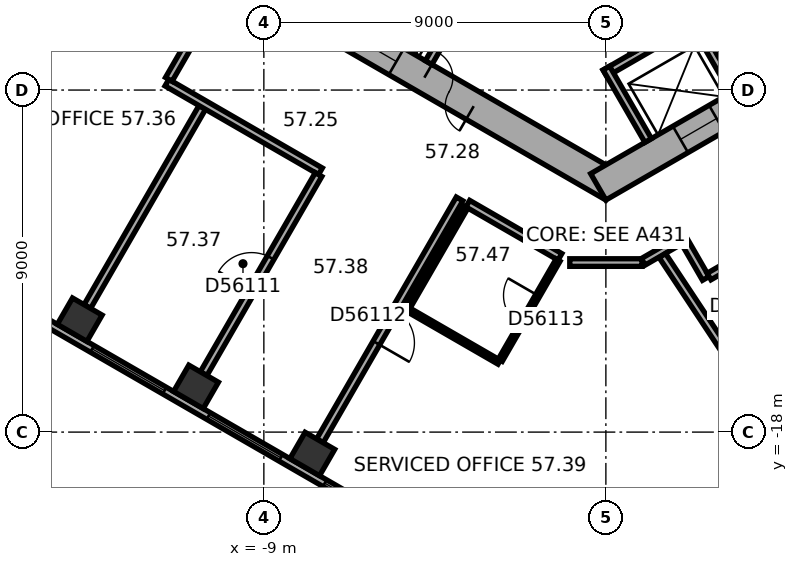
"""IFC4 building model, lengths in metres.
Left out: names, types, materials, properties, quantities, classifications, styles, units other than length and angle.
Written with IfcOpenShell. Run it as: python <this file> out.ifc"""

import sys

from ifc_helpers import new_model, si_unit, direction, frame, frame_2d, origin, origin_2d, place, context, subcontext, project, spatial, rectangle, extrude, element, fill, save


model = new_model("IFC4")
c1 = context("Model", 3, precision=1e-05, world=origin(), true_north=direction((0.0, 1.0)))
c2 = subcontext(c1, "Body", "Model", "MODEL_VIEW")
j1 = project(units=[si_unit("LENGTHUNIT", "METRE"), si_unit("PLANEANGLEUNIT", "RADIAN")], contexts=[c1])
p1 = place(None, origin())
s1 = spatial("IfcSite", under=j1, at=p1, CompositionType="ELEMENT")
p2 = place(p1, origin())
s2 = spatial("IfcBuilding", under=s1, at=p2, CompositionType="ELEMENT")
p3 = place(p2, frame((0.0, 0.0, 232.8)))
s3 = spatial("IfcBuildingStorey", under=s2, at=p3, CompositionType="ELEMENT", Elevation=232.8)
for number, where, z_axis, x_axis in (
    (1, (-13.845, -15.042, 0.0), (0.0, 0.0, 1.0), (0.866, -0.5, 0.0)),
    (2, (-10.785, -16.809, 0.0), (0.0, 0.0, 1.0), (0.866, -0.5, 0.0)),
    (3, (-7.725, -18.576, 0.0), (0.0, 0.0, 1.0), (0.866, -0.5, 0.0)),
):
    element("IfcColumn", number, at=place(p3, frame(where, z_axis=z_axis, x_axis=x_axis)), inside=s3, PredefinedType="COLUMN", context=c2, shape_type="SweptSolid", body=[
        extrude(rectangle(XDim=0.9, YDim=0.8, at=origin_2d()), origin(), (0.0, 0.0, 1.0), 3.7),
    ])
p4 = place(p3, frame((-10.1, -5.6, 0.0), z_axis=(0.0, 0.0, 1.0), x_axis=(0.866023897231, -0.500002609418, 0.0)))
e4 = element("IfcWall", 4, at=p4, inside=s3, PredefinedType="SHEAR", context=c2, shape_type="SweptSolid", body=[
    extrude(rectangle(XDim=11.894, YDim=0.8, at=frame_2d((5.947, 0.0))), origin(), (0.0, 0.0, 1.0), 3.7),
])
p5 = place(p4, frame((6.147, 0.0, 0.0)))
e5 = element("IfcOpeningElement", 5, at=p5, cuts=e4, PredefinedType="OPENING", context=c2, shape_type="SweptSolid", body=[
    extrude(rectangle(XDim=1.5, YDim=2.1, at=frame_2d((0.75, 1.05))), frame((0.0, 0.41, 0.0), z_axis=(0.0, -1.0, 0.0), x_axis=(1.0, 0.0, 0.0)), (0.0, 0.0, 1.0), 0.82),
])
p6 = place(p4, frame((1.597, 0.0, 0.0)))
e6 = element("IfcOpeningElement", 6, at=p6, cuts=e4, PredefinedType="OPENING", context=c2, shape_type="SweptSolid", body=[
    extrude(rectangle(XDim=1.1, YDim=2.1, at=frame_2d((0.55, 1.05))), frame((0.0, 0.41, 0.0), z_axis=(0.0, -1.0, 0.0), x_axis=(1.0, 0.0, 0.0)), (0.0, 0.0, 1.0), 0.82),
])
p7 = place(p4, frame((4.197, 0.0, 0.0)))
e7 = element("IfcOpeningElement", 7, at=p7, cuts=e4, PredefinedType="OPENING", context=c2, shape_type="SweptSolid", body=[
    extrude(rectangle(XDim=1.1, YDim=2.1, at=frame_2d((0.55, 1.05))), frame((0.0, 0.41, 0.0), z_axis=(0.0, -1.0, 0.0), x_axis=(1.0, 0.0, 0.0)), (0.0, 0.0, 1.0), 0.82),
])
p8 = place(p3, frame((-0.2, -11.547, 0.0), z_axis=(0.0, 0.0, 1.0), x_axis=(0.866023897231, 0.500002609418, 0.0)))
e8 = element("IfcWall", 8, at=p8, inside=s3, PredefinedType="SHEAR", context=c2, shape_type="SweptSolid", body=[
    extrude(rectangle(XDim=11.894, YDim=0.8, at=frame_2d((5.947, 0.0))), origin(), (0.0, 0.0, 1.0), 3.7),
])
p9 = place(p8, frame((2.497, 0.0, 0.0)))
e9 = element("IfcOpeningElement", 9, at=p9, cuts=e8, PredefinedType="OPENING", context=c2, shape_type="SweptSolid", body=[
    extrude(rectangle(XDim=1.1, YDim=2.1, at=frame_2d((0.55, 1.05))), frame((0.0, 0.41, 0.0), z_axis=(0.0, -1.0, 0.0), x_axis=(1.0, 0.0, 0.0)), (0.0, 0.0, 1.0), 0.82),
])
p10 = place(p8, frame((5.097, 0.0, 0.0)))
e10 = element("IfcOpeningElement", 10, at=p10, cuts=e8, PredefinedType="OPENING", context=c2, shape_type="SweptSolid", body=[
    extrude(rectangle(XDim=1.1, YDim=2.1, at=frame_2d((0.55, 1.05))), frame((0.0, 0.41, 0.0), z_axis=(0.0, -1.0, 0.0), x_axis=(1.0, 0.0, 0.0)), (0.0, 0.0, 1.0), 0.82),
])
p11 = place(p8, frame((7.697, 0.0, 0.0)))
e11 = element("IfcOpeningElement", 11, at=p11, cuts=e8, PredefinedType="OPENING", context=c2, shape_type="SweptSolid", body=[
    extrude(rectangle(XDim=1.1, YDim=2.1, at=frame_2d((0.55, 1.05))), frame((0.0, 0.41, 0.0), z_axis=(0.0, -1.0, 0.0), x_axis=(1.0, 0.0, 0.0)), (0.0, 0.0, 1.0), 0.82),
])
p12 = place(p3, frame((-17.664, -13.415, 0.0), z_axis=(0.0, 0.0, 1.0), x_axis=(0.866026555358, -0.49999800541, 0.0)))
e12 = element("IfcWall", 12, at=p12, inside=s3, PredefinedType="STANDARD", context=c2, shape_type="SweptSolid", body=[
    extrude(rectangle(XDim=18.841, YDim=0.2, at=frame_2d((9.421, 0.0))), origin(), (0.0, 0.0, 1.0), 3.7),
])
p13 = place(p12, frame((1.254, 0.0, 0.9)))
e13 = element("IfcOpeningElement", 13, at=p13, cuts=e12, PredefinedType="OPENING", context=c2, shape_type="SweptSolid", body=[
    extrude(rectangle(XDim=2.2, YDim=2.0, at=frame_2d((1.1, 1.0))), frame((0.0, 0.11, 0.0), z_axis=(0.0, -1.0, 0.0), x_axis=(1.0, 0.0, 0.0)), (0.0, 0.0, 1.0), 0.22),
])
p14 = place(p12, frame((4.788, 0.0, 0.9)))
e14 = element("IfcOpeningElement", 14, at=p14, cuts=e12, PredefinedType="OPENING", context=c2, shape_type="SweptSolid", body=[
    extrude(rectangle(XDim=2.2, YDim=2.0, at=frame_2d((1.1, 1.0))), frame((0.0, 0.11, 0.0), z_axis=(0.0, -1.0, 0.0), x_axis=(1.0, 0.0, 0.0)), (0.0, 0.0, 1.0), 0.22),
])
p15 = place(p12, frame((8.322, 0.0, 0.9)))
e15 = element("IfcOpeningElement", 15, at=p15, cuts=e12, PredefinedType="OPENING", context=c2, shape_type="SweptSolid", body=[
    extrude(rectangle(XDim=2.2, YDim=2.0, at=frame_2d((1.1, 1.0))), frame((0.0, 0.11, 0.0), z_axis=(0.0, -1.0, 0.0), x_axis=(1.0, 0.0, 0.0)), (0.0, 0.0, 1.0), 0.22),
])
p16 = place(p12, frame((11.855, 0.0, 0.9)))
e16 = element("IfcOpeningElement", 16, at=p16, cuts=e12, PredefinedType="OPENING", context=c2, shape_type="SweptSolid", body=[
    extrude(rectangle(XDim=2.2, YDim=2.0, at=frame_2d((1.1, 1.0))), frame((0.0, 0.11, 0.0), z_axis=(0.0, -1.0, 0.0), x_axis=(1.0, 0.0, 0.0)), (0.0, 0.0, 1.0), 0.22),
])
p17 = place(p12, frame((15.389, 0.0, 0.9)))
e17 = element("IfcOpeningElement", 17, at=p17, cuts=e12, PredefinedType="OPENING", context=c2, shape_type="SweptSolid", body=[
    extrude(rectangle(XDim=2.2, YDim=2.0, at=frame_2d((1.1, 1.0))), frame((0.0, 0.11, 0.0), z_axis=(0.0, -1.0, 0.0), x_axis=(1.0, 0.0, 0.0)), (0.0, 0.0, 1.0), 0.22),
])
p18 = place(p3, frame((2.739, -22.711, 0.0), z_axis=(0.0, 0.0, 1.0), x_axis=(0.833885723098, 0.551937134838, 0.0)))
e18 = element("IfcWall", 18, at=p18, inside=s3, PredefinedType="STANDARD", context=c2, shape_type="SweptSolid", body=[
    extrude(rectangle(XDim=18.841, YDim=0.2, at=frame_2d((9.421, 0.0))), origin(), (0.0, 0.0, 1.0), 3.7),
])
p19 = place(p18, frame((1.252, 0.0, 0.9)))
e19 = element("IfcOpeningElement", 19, at=p19, cuts=e18, PredefinedType="OPENING", context=c2, shape_type="SweptSolid", body=[
    extrude(rectangle(XDim=2.2, YDim=2.0, at=frame_2d((1.1, 1.0))), frame((0.0, 0.11, 0.0), z_axis=(0.0, -1.0, 0.0), x_axis=(1.0, 0.0, 0.0)), (0.0, 0.0, 1.0), 0.22),
])
p20 = place(p18, frame((4.786, 0.0, 0.9)))
e20 = element("IfcOpeningElement", 20, at=p20, cuts=e18, PredefinedType="OPENING", context=c2, shape_type="SweptSolid", body=[
    extrude(rectangle(XDim=2.2, YDim=2.0, at=frame_2d((1.1, 1.0))), frame((0.0, 0.11, 0.0), z_axis=(0.0, -1.0, 0.0), x_axis=(1.0, 0.0, 0.0)), (0.0, 0.0, 1.0), 0.22),
])
p21 = place(p18, frame((8.32, 0.0, 0.9)))
e21 = element("IfcOpeningElement", 21, at=p21, cuts=e18, PredefinedType="OPENING", context=c2, shape_type="SweptSolid", body=[
    extrude(rectangle(XDim=2.2, YDim=2.0, at=frame_2d((1.1, 1.0))), frame((0.0, 0.11, 0.0), z_axis=(0.0, -1.0, 0.0), x_axis=(1.0, 0.0, 0.0)), (0.0, 0.0, 1.0), 0.22),
])
p22 = place(p18, frame((11.854, 0.0, 0.9)))
e22 = element("IfcOpeningElement", 22, at=p22, cuts=e18, PredefinedType="OPENING", context=c2, shape_type="SweptSolid", body=[
    extrude(rectangle(XDim=2.2, YDim=2.0, at=frame_2d((1.1, 1.0))), frame((0.0, 0.11, 0.0), z_axis=(0.0, -1.0, 0.0), x_axis=(1.0, 0.0, 0.0)), (0.0, 0.0, 1.0), 0.22),
])
p23 = place(p18, frame((15.387, 0.0, 0.9)))
e23 = element("IfcOpeningElement", 23, at=p23, cuts=e18, PredefinedType="OPENING", context=c2, shape_type="SweptSolid", body=[
    extrude(rectangle(XDim=2.2, YDim=2.0, at=frame_2d((1.1, 1.0))), frame((0.0, 0.11, 0.0), z_axis=(0.0, -1.0, 0.0), x_axis=(1.0, 0.0, 0.0)), (0.0, 0.0, 1.0), 0.22),
])
p24 = place(p3, frame((-3.563, -6.372, 0.0), z_axis=(0.0, 0.0, 1.0), x_axis=(-0.499994660107, -0.866028486751, 0.0)))
e24 = element("IfcWall", 24, at=p24, inside=s3, PredefinedType="PARTITIONING", context=c2, shape_type="SweptSolid", body=[
    extrude(rectangle(XDim=2.2, YDim=0.2, at=frame_2d((1.1, 0.0))), origin(), (0.0, 0.0, 1.0), 3.42),
])
p25 = place(p3, frame((-0.024, -8.559, 0.0), z_axis=(0.0, 0.0, 1.0), x_axis=(0.866026010844, 0.49999894854, 0.0)))
e25 = element("IfcWall", 25, at=p25, inside=s3, PredefinedType="PARTITIONING", context=c2, shape_type="SweptSolid", body=[
    extrude(rectangle(XDim=8.0, YDim=0.2, at=frame_2d((4.0, 0.0))), origin(), (0.0, 0.0, 1.0), 3.42),
])
for number, where, z_axis, x_axis in (
    (26, (0.013, -8.422, 0.0), (0.0, 0.0, 1.0), (0.5, -0.866, 0.0)),
    (27, (2.264, -7.122, 0.0), (0.0, 0.0, 1.0), (0.5, -0.866, 0.0)),
):
    element("IfcWall", number, at=place(p3, frame(where, z_axis=z_axis, x_axis=x_axis)), inside=s3, PredefinedType="PARTITIONING", context=c2, shape_type="SweptSolid", body=[
        extrude(rectangle(XDim=2.2, YDim=0.2, at=frame_2d((1.1, 0.0))), origin(), (0.0, 0.0, 1.0), 3.42),
    ])
p26 = place(p3, frame((-1.558, -3.902, 0.0), z_axis=(0.0, 0.0, 1.0), x_axis=(0.499977259774, -0.866038532462, 0.0)))
e28 = element("IfcWall", 28, at=p26, inside=s3, PredefinedType="SHEAR", context=c2, shape_type="SweptSolid", body=[
    extrude(rectangle(XDim=4.7, YDim=0.3, at=frame_2d((2.35, 0.0))), origin(), (0.0, 0.0, 1.0), 3.42),
])
p27 = place(p26, frame((0.8, 0.0, 0.0)))
e29 = element("IfcOpeningElement", 29, at=p27, cuts=e28, PredefinedType="OPENING", context=c2, shape_type="SweptSolid", body=[
    extrude(rectangle(XDim=1.2, YDim=2.1, at=frame_2d((0.6, 1.05))), frame((0.0, 0.16, 0.0), z_axis=(0.0, -1.0, 0.0), x_axis=(1.0, 0.0, 0.0)), (0.0, 0.0, 1.0), 0.32),
])
p28 = place(p3, frame((-13.646, -14.696, 0.0), z_axis=(0.0, 0.0, 1.0), x_axis=(0.500006596359, 0.866021595341, 0.0)))
e30 = element("IfcWall", 30, at=p28, inside=s3, PredefinedType="PARTITIONING", context=c2, shape_type="SweptSolid", body=[
    extrude(rectangle(XDim=6.049, YDim=0.2, at=frame_2d((3.025, 0.0))), origin(), (0.0, 0.0, 1.0), 3.42),
])
p29 = place(p3, frame((-11.551, -8.805, 0.0), z_axis=(0.0, 0.0, 1.0), x_axis=(0.866038310922, -0.499977643516, 0.0)))
e31 = element("IfcWall", 31, at=p29, inside=s3, PredefinedType="PARTITIONING", context=c2, shape_type="SweptSolid", body=[
    extrude(rectangle(XDim=4.665, YDim=0.2, at=frame_2d((2.333, 0.0))), origin(), (0.0, 0.0, 1.0), 3.42),
])
p30 = place(p3, frame((-10.951, -7.765, 0.0), z_axis=(0.0, 0.0, 1.0), x_axis=(-0.499978356969, -0.866037899034, 0.0)))
e32 = element("IfcWall", 32, at=p30, inside=s3, PredefinedType="PARTITIONING", context=c2, shape_type="SweptSolid", body=[
    extrude(rectangle(XDim=1.101, YDim=0.2, at=frame_2d((0.551, 0.0))), origin(), (0.0, 0.0, 1.0), 3.42),
])
p31 = place(p3, frame((-10.585, -16.463, 0.0), z_axis=(0.0, 0.0, 1.0), x_axis=(0.499993802756, 0.866028981735, 0.0)))
e33 = element("IfcWall", 33, at=p31, inside=s3, PredefinedType="PARTITIONING", context=c2, shape_type="SweptSolid", body=[
    extrude(rectangle(XDim=6.049, YDim=0.2, at=frame_2d((3.024, 0.0))), origin(), (0.0, 0.0, 1.0), 2.87),
])
p32 = place(p31, frame((2.524, 0.0, 0.0)))
e34 = element("IfcOpeningElement", 34, at=p32, cuts=e33, PredefinedType="OPENING", context=c2, shape_type="SweptSolid", body=[
    extrude(rectangle(XDim=1.0, YDim=2.1, at=frame_2d((0.5, 1.05))), frame((0.0, 0.11, 0.0), z_axis=(0.0, -1.0, 0.0), x_axis=(1.0, 0.0, 0.0)), (0.0, 0.0, 1.0), 0.22),
])
p33 = place(p3, frame((-7.525, -18.23, 0.0), z_axis=(0.0, 0.0, 1.0), x_axis=(0.499983153418, 0.866035129944, 0.0)))
e35 = element("IfcWall", 35, at=p33, inside=s3, PredefinedType="PARTITIONING", context=c2, shape_type="SweptSolid", body=[
    extrude(rectangle(XDim=7.35, YDim=0.2, at=frame_2d((3.675, 0.0))), origin(), (0.0, 0.0, 1.0), 3.42),
])
p34 = place(p33, frame((2.975, 0.0, 0.0)))
e36 = element("IfcOpeningElement", 36, at=p34, cuts=e35, PredefinedType="OPENING", context=c2, shape_type="SweptSolid", body=[
    extrude(rectangle(XDim=1.0, YDim=2.1, at=frame_2d((0.5, 1.05))), frame((0.0, 0.11, 0.0), z_axis=(0.0, -1.0, 0.0), x_axis=(1.0, 0.0, 0.0)), (0.0, 0.0, 1.0), 0.22),
])
p35 = place(p3, frame((-5.233, -14.761, 0.0), z_axis=(0.0, 0.0, 1.0), x_axis=(0.499967891604, 0.866043940782, 0.0)))
e37 = element("IfcWall", 37, at=p35, inside=s3, PredefinedType="PARTITIONING", context=c2, shape_type="SweptSolid", body=[
    extrude(rectangle(XDim=3.1, YDim=0.12, at=frame_2d((1.55, 0.0))), origin(), (0.0, 0.0, 1.0), 3.42),
])
p36 = place(p3, frame((-3.634, -11.99, 0.0), z_axis=(0.0, 0.0, 1.0), x_axis=(0.866018616679, -0.500011755427, 0.0)))
e38 = element("IfcWall", 38, at=p36, inside=s3, PredefinedType="PARTITIONING", context=c2, shape_type="SweptSolid", body=[
    extrude(rectangle(XDim=2.8, YDim=0.2, at=frame_2d((1.4, 0.0))), origin(), (0.0, 0.0, 1.0), 3.42),
])
p37 = place(p3, frame((-2.809, -16.161, 0.0), z_axis=(0.0, 0.0, 1.0), x_axis=(-0.865997131366, 0.500048966069, 0.0)))
e39 = element("IfcWall", 39, at=p37, inside=s3, PredefinedType="PARTITIONING", context=c2, shape_type="SweptSolid", body=[
    extrude(rectangle(XDim=2.74, YDim=0.12, at=frame_2d((1.37, 0.0))), origin(), (0.0, 0.0, 1.0), 3.42),
])
p38 = place(p3, frame((-1.259, -13.476, 0.0), z_axis=(0.0, 0.0, 1.0), x_axis=(-0.500026023896, -0.86601037836, 0.0)))
e40 = element("IfcWall", 40, at=p38, inside=s3, PredefinedType="PARTITIONING", context=c2, shape_type="SweptSolid", body=[
    extrude(rectangle(XDim=3.04, YDim=0.12, at=frame_2d((1.52, 0.0))), origin(), (0.0, 0.0, 1.0), 3.42),
])
p39 = place(p38, frame((1.07, 0.0, 0.0)))
e41 = element("IfcOpeningElement", 41, at=p39, cuts=e40, PredefinedType="OPENING", context=c2, shape_type="SweptSolid", body=[
    extrude(rectangle(XDim=0.9, YDim=2.1, at=frame_2d((0.45, 1.05))), frame((0.0, 0.07, 0.0), z_axis=(0.0, -1.0, 0.0), x_axis=(1.0, 0.0, 0.0)), (0.0, 0.0, 1.0), 0.14),
])
p40 = place(p3, frame((-0.95, -13.539, 0.0), z_axis=(0.0, 0.0, 1.0), x_axis=(1.0, 0.0, 0.0)))
e42 = element("IfcWall", 42, at=p40, inside=s3, PredefinedType="PARTITIONING", context=c2, shape_type="SweptSolid", body=[
    extrude(rectangle(XDim=1.9, YDim=0.2, at=frame_2d((0.95, 0.0))), origin(), (0.0, 0.0, 1.0), 3.42),
])
p41 = place(p3, frame((0.985, -13.519, 0.0), z_axis=(0.0, 0.0, 1.0), x_axis=(0.866054082991, 0.499950322867, 0.0)))
e43 = element("IfcWall", 43, at=p41, inside=s3, PredefinedType="PARTITIONING", context=c2, shape_type="SweptSolid", body=[
    extrude(rectangle(XDim=1.206, YDim=0.2, at=frame_2d((0.603, 0.0))), origin(), (0.0, 0.0, 1.0), 3.42),
])
p42 = place(p3, frame((2.079, -13.003, 0.0), z_axis=(0.0, 0.0, 1.0), x_axis=(0.500074377092, -0.865982457891, 0.0)))
e44 = element("IfcWall", 44, at=p42, inside=s3, PredefinedType="PARTITIONING", context=c2, shape_type="SweptSolid", body=[
    extrude(rectangle(XDim=1.101, YDim=0.2, at=frame_2d((0.55, 0.0))), origin(), (0.0, 0.0, 1.0), 3.42),
])
p43 = place(p3, frame((2.716, -13.906, 0.0), z_axis=(0.0, 0.0, 1.0), x_axis=(0.866040290674, 0.499974214264, 0.0)))
e45 = element("IfcWall", 45, at=p43, inside=s3, PredefinedType="PARTITIONING", context=c2, shape_type="SweptSolid", body=[
    extrude(rectangle(XDim=8.702, YDim=0.2, at=frame_2d((4.351, 0.0))), origin(), (0.0, 0.0, 1.0), 3.42),
])
p44 = place(p43, frame((2.679, 0.0, 0.0)))
e46 = element("IfcOpeningElement", 46, at=p44, cuts=e45, PredefinedType="OPENING", context=c2, shape_type="SweptSolid", body=[
    extrude(rectangle(XDim=1.0, YDim=2.1, at=frame_2d((0.5, 1.05))), frame((0.0, 0.11, 0.0), z_axis=(0.0, -1.0, 0.0), x_axis=(1.0, 0.0, 0.0)), (0.0, 0.0, 1.0), 0.22),
])
p45 = place(p3, frame((5.677, -19.687, 0.0), z_axis=(0.0, 0.0, 1.0), x_axis=(-0.551936619203, 0.833886064389, 0.0)))
e47 = element("IfcWall", 47, at=p45, inside=s3, PredefinedType="PARTITIONING", context=c2, shape_type="SweptSolid", body=[
    extrude(rectangle(XDim=7.592, YDim=0.2, at=frame_2d((3.796, 0.0))), origin(), (0.0, 0.0, 1.0), 3.42),
])
p46 = place(p14, origin())
e48 = element("IfcWindow", 48, at=p46, inside=s3, PartitioningType="SINGLE_PANEL", PredefinedType="WINDOW", context=c2, shape_type="SweptSolid", body=[
    extrude(rectangle(XDim=2.2, YDim=2.0, at=frame_2d((1.1, 1.0))), frame((0.0, 0.03, 0.0), z_axis=(0.0, -1.0, 0.0), x_axis=(1.0, 0.0, 0.0)), (0.0, 0.0, 1.0), 0.06),
])
fill(e14, e48)
p47 = place(p15, origin())
e49 = element("IfcWindow", 49, at=p47, inside=s3, PartitioningType="SINGLE_PANEL", PredefinedType="WINDOW", context=c2, shape_type="SweptSolid", body=[
    extrude(rectangle(XDim=2.2, YDim=2.0, at=frame_2d((1.1, 1.0))), frame((0.0, 0.03, 0.0), z_axis=(0.0, -1.0, 0.0), x_axis=(1.0, 0.0, 0.0)), (0.0, 0.0, 1.0), 0.06),
])
fill(e15, e49)
p48 = place(p16, origin())
e50 = element("IfcWindow", 50, at=p48, inside=s3, PartitioningType="SINGLE_PANEL", PredefinedType="WINDOW", context=c2, shape_type="SweptSolid", body=[
    extrude(rectangle(XDim=2.2, YDim=2.0, at=frame_2d((1.1, 1.0))), frame((0.0, 0.03, 0.0), z_axis=(0.0, -1.0, 0.0), x_axis=(1.0, 0.0, 0.0)), (0.0, 0.0, 1.0), 0.06),
])
fill(e16, e50)
p49 = place(p5, origin())
e51 = element("IfcDoor", 51, at=p49, inside=s3, OperationType="DOUBLE_DOOR_SINGLE_SWING", PredefinedType="DOOR", context=c2, shape_type="SweptSolid", body=[
    extrude(rectangle(XDim=1.5, YDim=2.1, at=frame_2d((0.75, 1.05))), frame((0.0, 0.025, 0.0), z_axis=(0.0, -1.0, 0.0), x_axis=(1.0, 0.0, 0.0)), (0.0, 0.0, 1.0), 0.05),
])
fill(e5, e51)
p50 = place(p7, origin())
e52 = element("IfcDoor", 52, at=p50, inside=s3, OperationType="DOUBLE_DOOR_SLIDING", PredefinedType="DOOR", context=c2, shape_type="SweptSolid", body=[
    extrude(rectangle(XDim=1.1, YDim=2.1, at=frame_2d((0.55, 1.05))), frame((0.0, 0.025, 0.0), z_axis=(0.0, -1.0, 0.0), x_axis=(1.0, 0.0, 0.0)), (0.0, 0.0, 1.0), 0.05),
])
fill(e7, e52)
p51 = place(p9, origin())
e53 = element("IfcDoor", 53, at=p51, inside=s3, OperationType="DOUBLE_DOOR_SLIDING", PredefinedType="DOOR", context=c2, shape_type="SweptSolid", body=[
    extrude(rectangle(XDim=1.1, YDim=2.1, at=frame_2d((0.55, 1.05))), frame((0.0, 0.025, 0.0), z_axis=(0.0, -1.0, 0.0), x_axis=(1.0, 0.0, 0.0)), (0.0, 0.0, 1.0), 0.05),
])
fill(e9, e53)
p52 = place(p32, origin())
e54 = element("IfcDoor", 54, at=p52, inside=s3, OperationType="SINGLE_SWING_LEFT", PredefinedType="DOOR", context=c2, shape_type="SweptSolid", body=[
    extrude(rectangle(XDim=1.0, YDim=2.1, at=frame_2d((0.5, 1.05))), frame((0.0, 0.025, 0.0), z_axis=(0.0, -1.0, 0.0), x_axis=(1.0, 0.0, 0.0)), (0.0, 0.0, 1.0), 0.05),
])
fill(e34, e54)
p53 = place(p34, origin())
e55 = element("IfcDoor", 55, at=p53, inside=s3, OperationType="SINGLE_SWING_LEFT", PredefinedType="DOOR", context=c2, shape_type="SweptSolid", body=[
    extrude(rectangle(XDim=1.0, YDim=2.1, at=frame_2d((0.5, 1.05))), frame((0.0, 0.025, 0.0), z_axis=(0.0, -1.0, 0.0), x_axis=(1.0, 0.0, 0.0)), (0.0, 0.0, 1.0), 0.05),
])
fill(e36, e55)
p54 = place(p39, origin())
e56 = element("IfcDoor", 56, at=p54, inside=s3, OperationType="SINGLE_SWING_LEFT", PredefinedType="DOOR", context=c2, shape_type="SweptSolid", body=[
    extrude(rectangle(XDim=0.9, YDim=2.1, at=frame_2d((0.45, 1.05))), frame((0.0, 0.025, 0.0), z_axis=(0.0, -1.0, 0.0), x_axis=(1.0, 0.0, 0.0)), (0.0, 0.0, 1.0), 0.05),
])
fill(e41, e56)
save(model, sys.argv[1])
